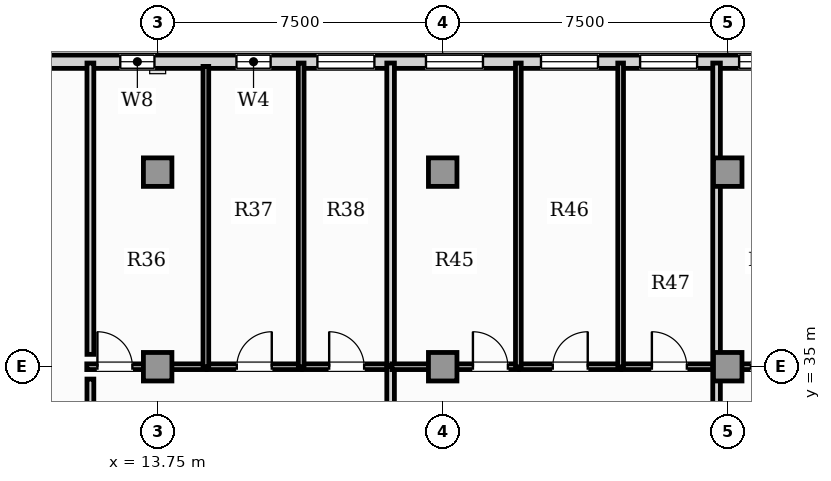
"""IFC4 building model, lengths in metres.
Left out: names, types, materials, properties, quantities, classifications, styles, units other than length and angle.
Written with IfcOpenShell. Run it as: python <this file> out.ifc"""

import sys

from ifc_helpers import new_model, si_unit, direction, frame, frame_2d, origin, origin_2d, place, context, subcontext, project, spatial, rectangle, extrude, element, fill, save


model = new_model("IFC4")
c1 = context("Model", 3, precision=1e-05, world=origin(), true_north=direction((0.0, 1.0)))
c2 = subcontext(c1, "Body", "Model", "MODEL_VIEW")
j1 = project(units=[si_unit("LENGTHUNIT", "METRE"), si_unit("PLANEANGLEUNIT", "RADIAN")], contexts=[c1])
p1 = place(None, origin())
s1 = spatial("IfcSite", under=j1, at=p1, CompositionType="ELEMENT")
p2 = place(p1, origin())
s2 = spatial("IfcBuilding", under=s1, at=p2, CompositionType="ELEMENT")
p3 = place(p2, frame((0.0, 0.0, 119.55)))
s3 = spatial("IfcBuildingStorey", under=s2, at=p3, CompositionType="ELEMENT", Elevation=119.55)
for number, where, z_axis, x_axis in (
    (1, (13.75, 40.12, 0.0), (0.0, 0.0, 1.0), (1.0, 0.0, 0.0)),
    (2, (21.25, 40.12, 0.0), (0.0, 0.0, 1.0), (1.0, 0.0, 0.0)),
    (3, (28.75, 40.12, 0.0), (0.0, 0.0, 1.0), (1.0, 0.0, 0.0)),
    (4, (13.75, 35.0, 0.0), (0.0, 0.0, 1.0), (1.0, 0.0, 0.0)),
    (5, (21.25, 35.0, 0.0), (0.0, 0.0, 1.0), (1.0, 0.0, 0.0)),
    (6, (28.75, 35.0, 0.0), (0.0, 0.0, 1.0), (1.0, 0.0, 0.0)),
):
    element("IfcColumn", number, at=place(p3, frame(where, z_axis=z_axis, x_axis=x_axis)), inside=s3, PredefinedType="COLUMN", context=c2, shape_type="SweptSolid", body=[
        extrude(rectangle(XDim=0.75, YDim=0.75, at=origin_2d()), origin(), (0.0, 0.0, 1.0), 3.85),
    ])
p4 = place(p3, frame((51.66, 43.025, 0.0), z_axis=(0.0, 0.0, 1.0), x_axis=(-1.0, 0.0, 0.0)))
e7 = element("IfcWall", 7, at=p4, inside=s3, PredefinedType="SOLIDWALL", context=c2, shape_type="SweptSolid", body=[
    extrude(rectangle(XDim=45.82, YDim=0.35, at=frame_2d((22.91, 0.0))), origin(), (0.0, 0.0, 1.0), 3.6),
])
p5 = place(p4, frame((42.468, 0.0, 0.9)))
e8 = element("IfcOpeningElement", 8, at=p5, cuts=e7, PredefinedType="OPENING", context=c2, shape_type="SweptSolid", body=[
    extrude(rectangle(XDim=1.5, YDim=1.95, at=frame_2d((0.75, 0.975))), frame((0.0, 0.185, 0.0), z_axis=(0.0, -1.0, 0.0), x_axis=(1.0, 0.0, 0.0)), (0.0, 0.0, 1.0), 0.37),
])
p6 = place(p4, frame((1.853, 0.0, 0.9)))
e9 = element("IfcOpeningElement", 9, at=p6, cuts=e7, PredefinedType="OPENING", context=c2, shape_type="SweptSolid", body=[
    extrude(rectangle(XDim=1.5, YDim=1.95, at=frame_2d((0.75, 0.975))), frame((0.0, 0.185, 0.0), z_axis=(0.0, -1.0, 0.0), x_axis=(1.0, 0.0, 0.0)), (0.0, 0.0, 1.0), 0.37),
])
p7 = place(p4, frame((37.994, 0.0, 0.9)))
e10 = element("IfcOpeningElement", 10, at=p7, cuts=e7, PredefinedType="OPENING", context=c2, shape_type="SweptSolid", body=[
    extrude(rectangle(XDim=0.9, YDim=1.4, at=frame_2d((0.45, 0.7))), frame((0.0, 0.185, 0.0), z_axis=(0.0, -1.0, 0.0), x_axis=(1.0, 0.0, 0.0)), (0.0, 0.0, 1.0), 0.37),
])
p8 = place(p4, frame((34.938, 0.0, 0.95)))
e11 = element("IfcOpeningElement", 11, at=p8, cuts=e7, PredefinedType="OPENING", context=c2, shape_type="SweptSolid", body=[
    extrude(rectangle(XDim=0.9, YDim=1.5, at=frame_2d((0.45, 0.75))), frame((0.0, 0.185, 0.0), z_axis=(0.0, -1.0, 0.0), x_axis=(1.0, 0.0, 0.0)), (0.0, 0.0, 1.0), 0.37),
])
p9 = place(p4, frame((32.207, 0.0, 0.9)))
e12 = element("IfcOpeningElement", 12, at=p9, cuts=e7, PredefinedType="OPENING", context=c2, shape_type="SweptSolid", body=[
    extrude(rectangle(XDim=1.5, YDim=1.95, at=frame_2d((0.75, 0.975))), frame((0.0, 0.185, 0.0), z_axis=(0.0, -1.0, 0.0), x_axis=(1.0, 0.0, 0.0)), (0.0, 0.0, 1.0), 0.37),
])
p10 = place(p4, frame((29.35, 0.0, 0.9)))
e13 = element("IfcOpeningElement", 13, at=p10, cuts=e7, PredefinedType="OPENING", context=c2, shape_type="SweptSolid", body=[
    extrude(rectangle(XDim=1.5, YDim=1.95, at=frame_2d((0.75, 0.975))), frame((0.0, 0.185, 0.0), z_axis=(0.0, -1.0, 0.0), x_axis=(1.0, 0.0, 0.0)), (0.0, 0.0, 1.0), 0.37),
])
p11 = place(p4, frame((26.324, 0.0, 0.9)))
e14 = element("IfcOpeningElement", 14, at=p11, cuts=e7, PredefinedType="OPENING", context=c2, shape_type="SweptSolid", body=[
    extrude(rectangle(XDim=1.5, YDim=1.95, at=frame_2d((0.75, 0.975))), frame((0.0, 0.185, 0.0), z_axis=(0.0, -1.0, 0.0), x_axis=(1.0, 0.0, 0.0)), (0.0, 0.0, 1.0), 0.37),
])
p12 = place(p4, frame((23.716, 0.0, 0.9)))
e15 = element("IfcOpeningElement", 15, at=p12, cuts=e7, PredefinedType="OPENING", context=c2, shape_type="SweptSolid", body=[
    extrude(rectangle(XDim=1.5, YDim=1.95, at=frame_2d((0.75, 0.975))), frame((0.0, 0.185, 0.0), z_axis=(0.0, -1.0, 0.0), x_axis=(1.0, 0.0, 0.0)), (0.0, 0.0, 1.0), 0.37),
])
p13 = place(p4, frame((21.11, 0.0, 0.9)))
e16 = element("IfcOpeningElement", 16, at=p13, cuts=e7, PredefinedType="OPENING", context=c2, shape_type="SweptSolid", body=[
    extrude(rectangle(XDim=1.5, YDim=1.95, at=frame_2d((0.75, 0.975))), frame((0.0, 0.185, 0.0), z_axis=(0.0, -1.0, 0.0), x_axis=(1.0, 0.0, 0.0)), (0.0, 0.0, 1.0), 0.37),
])
p14 = place(p4, frame((18.687, 0.0, 0.9)))
e17 = element("IfcOpeningElement", 17, at=p14, cuts=e7, PredefinedType="OPENING", context=c2, shape_type="SweptSolid", body=[
    extrude(rectangle(XDim=1.5, YDim=1.95, at=frame_2d((0.75, 0.975))), frame((0.0, 0.185, 0.0), z_axis=(0.0, -1.0, 0.0), x_axis=(1.0, 0.0, 0.0)), (0.0, 0.0, 1.0), 0.37),
])
p15 = place(p4, frame((16.594, 0.0, 0.9)))
e18 = element("IfcOpeningElement", 18, at=p15, cuts=e7, PredefinedType="OPENING", context=c2, shape_type="SweptSolid", body=[
    extrude(rectangle(XDim=1.5, YDim=1.95, at=frame_2d((0.75, 0.975))), frame((0.0, 0.185, 0.0), z_axis=(0.0, -1.0, 0.0), x_axis=(1.0, 0.0, 0.0)), (0.0, 0.0, 1.0), 0.37),
])
p16 = place(p4, frame((14.435, 0.0, 0.9)))
e19 = element("IfcOpeningElement", 19, at=p16, cuts=e7, PredefinedType="OPENING", context=c2, shape_type="SweptSolid", body=[
    extrude(rectangle(XDim=1.5, YDim=1.95, at=frame_2d((0.75, 0.975))), frame((0.0, 0.185, 0.0), z_axis=(0.0, -1.0, 0.0), x_axis=(1.0, 0.0, 0.0)), (0.0, 0.0, 1.0), 0.37),
])
p17 = place(p4, frame((11.725, 0.0, 0.9)))
e20 = element("IfcOpeningElement", 20, at=p17, cuts=e7, PredefinedType="OPENING", context=c2, shape_type="SweptSolid", body=[
    extrude(rectangle(XDim=1.5, YDim=1.95, at=frame_2d((0.75, 0.975))), frame((0.0, 0.185, 0.0), z_axis=(0.0, -1.0, 0.0), x_axis=(1.0, 0.0, 0.0)), (0.0, 0.0, 1.0), 0.37),
])
p18 = place(p4, frame((8.906, 0.0, 0.9)))
e21 = element("IfcOpeningElement", 21, at=p18, cuts=e7, PredefinedType="OPENING", context=c2, shape_type="SweptSolid", body=[
    extrude(rectangle(XDim=1.5, YDim=1.95, at=frame_2d((0.75, 0.975))), frame((0.0, 0.185, 0.0), z_axis=(0.0, -1.0, 0.0), x_axis=(1.0, 0.0, 0.0)), (0.0, 0.0, 1.0), 0.37),
])
p19 = place(p4, frame((6.476, 0.0, 0.9)))
e22 = element("IfcOpeningElement", 22, at=p19, cuts=e7, PredefinedType="OPENING", context=c2, shape_type="SweptSolid", body=[
    extrude(rectangle(XDim=1.5, YDim=1.95, at=frame_2d((0.75, 0.975))), frame((0.0, 0.185, 0.0), z_axis=(0.0, -1.0, 0.0), x_axis=(1.0, 0.0, 0.0)), (0.0, 0.0, 1.0), 0.37),
])
p20 = place(p3, frame((11.885, 35.0, 0.0), z_axis=(0.0, 0.0, 1.0), x_axis=(1.0, 0.0, 0.0)))
e23 = element("IfcWall", 23, at=p20, inside=s3, PredefinedType="PARTITIONING", context=c2, shape_type="SweptSolid", body=[
    extrude(rectangle(XDim=3.139, YDim=0.15, at=frame_2d((1.569, 0.0))), origin(), (0.0, 0.0, 1.0), 2.983),
])
p21 = place(p20, frame((0.28, 0.0, 0.0)))
e24 = element("IfcOpeningElement", 24, at=p21, cuts=e23, PredefinedType="OPENING", context=c2, shape_type="SweptSolid", body=[
    extrude(rectangle(XDim=0.92, YDim=2.1, at=frame_2d((0.46, 1.05))), frame((0.0, 0.085, 0.0), z_axis=(0.0, -1.0, 0.0), x_axis=(1.0, 0.0, 0.0)), (0.0, 0.0, 1.0), 0.17),
])
p22 = place(p3, frame((15.054, 35.0, 0.0), z_axis=(0.0, 0.0, 1.0), x_axis=(1.0, 0.0, 0.0)))
e25 = element("IfcWall", 25, at=p22, inside=s3, PredefinedType="PARTITIONING", context=c2, shape_type="SweptSolid", body=[
    extrude(rectangle(XDim=2.478, YDim=0.15, at=frame_2d((1.239, 0.0))), origin(), (0.0, 0.0, 1.0), 2.983),
])
p23 = place(p22, frame((0.779, 0.0, 0.0)))
e26 = element("IfcOpeningElement", 26, at=p23, cuts=e25, PredefinedType="OPENING", context=c2, shape_type="SweptSolid", body=[
    extrude(rectangle(XDim=0.92, YDim=2.1, at=frame_2d((0.46, 1.05))), frame((0.0, 0.085, 0.0), z_axis=(0.0, -1.0, 0.0), x_axis=(1.0, 0.0, 0.0)), (0.0, 0.0, 1.0), 0.17),
])
p24 = place(p3, frame((17.562, 35.0, 0.0), z_axis=(0.0, 0.0, 1.0), x_axis=(1.0, 0.0, 0.0)))
e27 = element("IfcWall", 27, at=p24, inside=s3, PredefinedType="PARTITIONING", context=c2, shape_type="SweptSolid", body=[
    extrude(rectangle(XDim=2.323, YDim=0.15, at=frame_2d((1.161, 0.0))), origin(), (0.0, 0.0, 1.0), 2.983),
])
p25 = place(p24, frame((0.701, 0.0, 0.0)))
e28 = element("IfcOpeningElement", 28, at=p25, cuts=e27, PredefinedType="OPENING", context=c2, shape_type="SweptSolid", body=[
    extrude(rectangle(XDim=0.92, YDim=2.1, at=frame_2d((0.46, 1.05))), frame((0.0, 0.085, 0.0), z_axis=(0.0, -1.0, 0.0), x_axis=(1.0, 0.0, 0.0)), (0.0, 0.0, 1.0), 0.17),
])
p26 = place(p3, frame((19.879, 33.495, 0.0), z_axis=(0.0, 0.0, 1.0), x_axis=(0.0, 1.0, 0.0)))
e29 = element("IfcWall", 29, at=p26, inside=s3, PredefinedType="PARTITIONING", context=c2, shape_type="SweptSolid", body=[
    extrude(rectangle(XDim=1.51, YDim=0.2, at=frame_2d((0.755, 0.0))), origin(), (0.0, 0.0, 1.0), 3.6),
])
p27 = place(p3, frame((15.019, 34.995, 0.0), z_axis=(0.0, 0.0, 1.0), x_axis=(0.0, 1.0, 0.0)))
e30 = element("IfcWall", 30, at=p27, inside=s3, PredefinedType="PARTITIONING", context=c2, shape_type="SweptSolid", body=[
    extrude(rectangle(XDim=7.907, YDim=0.15, at=frame_2d((3.954, 0.0))), origin(), (0.0, 0.0, 1.0), 3.6),
])
p28 = place(p3, frame((17.527, 34.995, 0.0), z_axis=(0.0, 0.0, 1.0), x_axis=(0.0, 1.0, 0.0)))
e31 = element("IfcWall", 31, at=p28, inside=s3, PredefinedType="PARTITIONING", context=c2, shape_type="SweptSolid", body=[
    extrude(rectangle(XDim=7.995, YDim=0.15, at=frame_2d((3.998, 0.0))), origin(), (0.0, 0.0, 1.0), 3.6),
])
p29 = place(p3, frame((19.879, 35.035, 0.0), z_axis=(0.0, 0.0, 1.0), x_axis=(0.0, 1.0, 0.0)))
e32 = element("IfcWall", 32, at=p29, inside=s3, PredefinedType="PARTITIONING", context=c2, shape_type="SweptSolid", body=[
    extrude(rectangle(XDim=7.955, YDim=0.2, at=frame_2d((3.978, 0.0))), origin(), (0.0, 0.0, 1.0), 3.6),
])
p30 = place(p3, frame((19.914, 35.0, 0.0), z_axis=(0.0, 0.0, 1.0), x_axis=(1.0, 0.0, 0.0)))
e33 = element("IfcWall", 33, at=p30, inside=s3, PredefinedType="PARTITIONING", context=c2, shape_type="SweptSolid", body=[
    extrude(rectangle(XDim=3.331, YDim=0.15, at=frame_2d((1.666, 0.0))), origin(), (0.0, 0.0, 1.0), 2.983),
])
p31 = place(p30, frame((2.131, 0.0, 0.0)))
e34 = element("IfcOpeningElement", 34, at=p31, cuts=e33, PredefinedType="OPENING", context=c2, shape_type="SweptSolid", body=[
    extrude(rectangle(XDim=0.92, YDim=2.1, at=frame_2d((0.46, 1.05))), frame((0.0, 0.085, 0.0), z_axis=(0.0, -1.0, 0.0), x_axis=(1.0, 0.0, 0.0)), (0.0, 0.0, 1.0), 0.17),
])
p32 = place(p3, frame((23.275, 35.0, 0.0), z_axis=(0.0, 0.0, 1.0), x_axis=(1.0, 0.0, 0.0)))
e35 = element("IfcWall", 35, at=p32, inside=s3, PredefinedType="PARTITIONING", context=c2, shape_type="SweptSolid", body=[
    extrude(rectangle(XDim=2.662, YDim=0.15, at=frame_2d((1.331, 0.0))), origin(), (0.0, 0.0, 1.0), 2.983),
])
p33 = place(p32, frame((0.871, 0.0, 0.0)))
e36 = element("IfcOpeningElement", 36, at=p33, cuts=e35, PredefinedType="OPENING", context=c2, shape_type="SweptSolid", body=[
    extrude(rectangle(XDim=0.92, YDim=2.1, at=frame_2d((0.46, 1.05))), frame((0.0, 0.085, 0.0), z_axis=(0.0, -1.0, 0.0), x_axis=(1.0, 0.0, 0.0)), (0.0, 0.0, 1.0), 0.17),
])
p34 = place(p3, frame((25.967, 35.0, 0.0), z_axis=(0.0, 0.0, 1.0), x_axis=(1.0, 0.0, 0.0)))
e37 = element("IfcWall", 37, at=p34, inside=s3, PredefinedType="PARTITIONING", context=c2, shape_type="SweptSolid", body=[
    extrude(rectangle(XDim=2.494, YDim=0.15, at=frame_2d((1.247, 0.0))), origin(), (0.0, 0.0, 1.0), 2.983),
])
p35 = place(p34, frame((0.787, 0.0, 0.0)))
e38 = element("IfcOpeningElement", 38, at=p35, cuts=e37, PredefinedType="OPENING", context=c2, shape_type="SweptSolid", body=[
    extrude(rectangle(XDim=0.92, YDim=2.1, at=frame_2d((0.46, 1.05))), frame((0.0, 0.085, 0.0), z_axis=(0.0, -1.0, 0.0), x_axis=(1.0, 0.0, 0.0)), (0.0, 0.0, 1.0), 0.17),
])
p36 = place(p3, frame((28.456, 33.495, 0.0), z_axis=(0.0, 0.0, 1.0), x_axis=(0.0, 1.0, 0.0)))
e39 = element("IfcWall", 39, at=p36, inside=s3, PredefinedType="PARTITIONING", context=c2, shape_type="SweptSolid", body=[
    extrude(rectangle(XDim=1.51, YDim=0.2, at=frame_2d((0.755, 0.0))), origin(), (0.0, 0.0, 1.0), 3.6),
])
for number, where, z_axis, x_axis in (
    (40, (23.24, 34.995, 0.0), (0.0, 0.0, 1.0), (0.0, 1.0, 0.0)),
    (41, (25.932, 34.995, 0.0), (0.0, 0.0, 1.0), (0.0, 1.0, 0.0)),
):
    element("IfcWall", number, at=place(p3, frame(where, z_axis=z_axis, x_axis=x_axis)), inside=s3, PredefinedType="PARTITIONING", context=c2, shape_type="SweptSolid", body=[
        extrude(rectangle(XDim=7.995, YDim=0.15, at=frame_2d((3.998, 0.0))), origin(), (0.0, 0.0, 1.0), 3.6),
    ])
p37 = place(p3, frame((28.456, 35.035, 0.0), z_axis=(0.0, 0.0, 1.0), x_axis=(0.0, 1.0, 0.0)))
e42 = element("IfcWall", 42, at=p37, inside=s3, PredefinedType="PARTITIONING", context=c2, shape_type="SweptSolid", body=[
    extrude(rectangle(XDim=7.955, YDim=0.2, at=frame_2d((3.978, 0.0))), origin(), (0.0, 0.0, 1.0), 3.6),
])
p38 = place(p3, frame((28.491, 35.0, 0.0), z_axis=(0.0, 0.0, 1.0), x_axis=(1.0, 0.0, 0.0)))
e43 = element("IfcWall", 43, at=p38, inside=s3, PredefinedType="PARTITIONING", context=c2, shape_type="SweptSolid", body=[
    extrude(rectangle(XDim=2.657, YDim=0.15, at=frame_2d((1.329, 0.0))), origin(), (0.0, 0.0, 1.0), 2.983),
])
p39 = place(p38, frame((0.868, 0.0, 0.0)))
e44 = element("IfcOpeningElement", 44, at=p39, cuts=e43, PredefinedType="OPENING", context=c2, shape_type="SweptSolid", body=[
    extrude(rectangle(XDim=0.92, YDim=2.1, at=frame_2d((0.46, 1.05))), frame((0.0, 0.085, 0.0), z_axis=(0.0, -1.0, 0.0), x_axis=(1.0, 0.0, 0.0)), (0.0, 0.0, 1.0), 0.17),
])
p40 = place(p3, frame((11.98, 33.825, 0.0), z_axis=(0.0, 0.0, 1.0), x_axis=(0.0, 1.0, 0.0)))
e45 = element("IfcWall", 45, at=p40, inside=s3, PredefinedType="PARTITIONING", context=c2, shape_type="SweptSolid", body=[
    extrude(rectangle(XDim=0.85, YDim=0.18, at=frame_2d((0.425, 0.0))), origin(), (0.0, 0.0, 1.0), 3.6),
])
p41 = place(p3, frame((11.98, 35.325, 0.0), z_axis=(0.0, 0.0, 1.0), x_axis=(0.0, 1.0, 0.0)))
e46 = element("IfcWall", 46, at=p41, inside=s3, PredefinedType="PARTITIONING", context=c2, shape_type="SweptSolid", body=[
    extrude(rectangle(XDim=7.665, YDim=0.18, at=frame_2d((3.833, 0.0))), origin(), (0.0, 0.0, 1.0), 3.6),
])
p42 = place(p7, origin())
e47 = element("IfcWindow", 47, at=p42, inside=s3, PartitioningType="SINGLE_PANEL", PredefinedType="WINDOW", context=c2, shape_type="SweptSolid", body=[
    extrude(rectangle(XDim=0.9, YDim=1.4, at=frame_2d((0.45, 0.7))), frame((0.0, 0.03, 0.0), z_axis=(0.0, -1.0, 0.0), x_axis=(1.0, 0.0, 0.0)), (0.0, 0.0, 1.0), 0.06),
])
fill(e10, e47)
p43 = place(p8, origin())
e48 = element("IfcWindow", 48, at=p43, inside=s3, PartitioningType="SINGLE_PANEL", PredefinedType="WINDOW", context=c2, shape_type="SweptSolid", body=[
    extrude(rectangle(XDim=0.9, YDim=1.5, at=frame_2d((0.45, 0.75))), frame((0.0, 0.03, 0.0), z_axis=(0.0, -1.0, 0.0), x_axis=(1.0, 0.0, 0.0)), (0.0, 0.0, 1.0), 0.06),
])
fill(e11, e48)
p44 = place(p9, origin())
e49 = element("IfcWindow", 49, at=p44, inside=s3, PartitioningType="SINGLE_PANEL", PredefinedType="WINDOW", context=c2, shape_type="SweptSolid", body=[
    extrude(rectangle(XDim=1.5, YDim=1.95, at=frame_2d((0.75, 0.975))), frame((0.0, 0.03, 0.0), z_axis=(0.0, -1.0, 0.0), x_axis=(1.0, 0.0, 0.0)), (0.0, 0.0, 1.0), 0.06),
])
fill(e12, e49)
p45 = place(p10, origin())
e50 = element("IfcWindow", 50, at=p45, inside=s3, PartitioningType="SINGLE_PANEL", PredefinedType="WINDOW", context=c2, shape_type="SweptSolid", body=[
    extrude(rectangle(XDim=1.5, YDim=1.95, at=frame_2d((0.75, 0.975))), frame((0.0, 0.03, 0.0), z_axis=(0.0, -1.0, 0.0), x_axis=(1.0, 0.0, 0.0)), (0.0, 0.0, 1.0), 0.06),
])
fill(e13, e50)
p46 = place(p11, origin())
e51 = element("IfcWindow", 51, at=p46, inside=s3, PartitioningType="SINGLE_PANEL", PredefinedType="WINDOW", context=c2, shape_type="SweptSolid", body=[
    extrude(rectangle(XDim=1.5, YDim=1.95, at=frame_2d((0.75, 0.975))), frame((0.0, 0.03, 0.0), z_axis=(0.0, -1.0, 0.0), x_axis=(1.0, 0.0, 0.0)), (0.0, 0.0, 1.0), 0.06),
])
fill(e14, e51)
p47 = place(p12, origin())
e52 = element("IfcWindow", 52, at=p47, inside=s3, PartitioningType="SINGLE_PANEL", PredefinedType="WINDOW", context=c2, shape_type="SweptSolid", body=[
    extrude(rectangle(XDim=1.5, YDim=1.95, at=frame_2d((0.75, 0.975))), frame((0.0, 0.03, 0.0), z_axis=(0.0, -1.0, 0.0), x_axis=(1.0, 0.0, 0.0)), (0.0, 0.0, 1.0), 0.06),
])
fill(e15, e52)
p48 = place(p13, origin())
e53 = element("IfcWindow", 53, at=p48, inside=s3, PartitioningType="SINGLE_PANEL", PredefinedType="WINDOW", context=c2, shape_type="SweptSolid", body=[
    extrude(rectangle(XDim=1.5, YDim=1.95, at=frame_2d((0.75, 0.975))), frame((0.0, 0.03, 0.0), z_axis=(0.0, -1.0, 0.0), x_axis=(1.0, 0.0, 0.0)), (0.0, 0.0, 1.0), 0.06),
])
fill(e16, e53)
p49 = place(p21, origin())
e54 = element("IfcDoor", 54, at=p49, inside=s3, OperationType="SINGLE_SWING_LEFT", PredefinedType="DOOR", context=c2, shape_type="SweptSolid", body=[
    extrude(rectangle(XDim=0.92, YDim=2.1, at=frame_2d((0.46, 1.05))), frame((0.0, 0.025, 0.0), z_axis=(0.0, -1.0, 0.0), x_axis=(1.0, 0.0, 0.0)), (0.0, 0.0, 1.0), 0.05),
])
fill(e24, e54)
p50 = place(p23, origin())
e55 = element("IfcDoor", 55, at=p50, inside=s3, OperationType="SINGLE_SWING_RIGHT", PredefinedType="DOOR", context=c2, shape_type="SweptSolid", body=[
    extrude(rectangle(XDim=0.92, YDim=2.1, at=frame_2d((0.46, 1.05))), frame((0.0, 0.025, 0.0), z_axis=(0.0, -1.0, 0.0), x_axis=(1.0, 0.0, 0.0)), (0.0, 0.0, 1.0), 0.05),
])
fill(e26, e55)
p51 = place(p25, origin())
e56 = element("IfcDoor", 56, at=p51, inside=s3, OperationType="SINGLE_SWING_LEFT", PredefinedType="DOOR", context=c2, shape_type="SweptSolid", body=[
    extrude(rectangle(XDim=0.92, YDim=2.1, at=frame_2d((0.46, 1.05))), frame((0.0, 0.025, 0.0), z_axis=(0.0, -1.0, 0.0), x_axis=(1.0, 0.0, 0.0)), (0.0, 0.0, 1.0), 0.05),
])
fill(e28, e56)
p52 = place(p31, origin())
e57 = element("IfcDoor", 57, at=p52, inside=s3, OperationType="SINGLE_SWING_LEFT", PredefinedType="DOOR", context=c2, shape_type="SweptSolid", body=[
    extrude(rectangle(XDim=0.92, YDim=2.1, at=frame_2d((0.46, 1.05))), frame((0.0, 0.025, 0.0), z_axis=(0.0, -1.0, 0.0), x_axis=(1.0, 0.0, 0.0)), (0.0, 0.0, 1.0), 0.05),
])
fill(e34, e57)
p53 = place(p33, origin())
e58 = element("IfcDoor", 58, at=p53, inside=s3, OperationType="SINGLE_SWING_RIGHT", PredefinedType="DOOR", context=c2, shape_type="SweptSolid", body=[
    extrude(rectangle(XDim=0.92, YDim=2.1, at=frame_2d((0.46, 1.05))), frame((0.0, 0.025, 0.0), z_axis=(0.0, -1.0, 0.0), x_axis=(1.0, 0.0, 0.0)), (0.0, 0.0, 1.0), 0.05),
])
fill(e36, e58)
p54 = place(p35, origin())
e59 = element("IfcDoor", 59, at=p54, inside=s3, OperationType="SINGLE_SWING_LEFT", PredefinedType="DOOR", context=c2, shape_type="SweptSolid", body=[
    extrude(rectangle(XDim=0.92, YDim=2.1, at=frame_2d((0.46, 1.05))), frame((0.0, 0.025, 0.0), z_axis=(0.0, -1.0, 0.0), x_axis=(1.0, 0.0, 0.0)), (0.0, 0.0, 1.0), 0.05),
])
fill(e38, e59)
p55 = place(p39, origin())
e60 = element("IfcDoor", 60, at=p55, inside=s3, OperationType="SINGLE_SWING_RIGHT", PredefinedType="DOOR", context=c2, shape_type="SweptSolid", body=[
    extrude(rectangle(XDim=0.92, YDim=2.1, at=frame_2d((0.46, 1.05))), frame((0.0, 0.025, 0.0), z_axis=(0.0, -1.0, 0.0), x_axis=(1.0, 0.0, 0.0)), (0.0, 0.0, 1.0), 0.05),
])
fill(e44, e60)
save(model, sys.argv[1])
